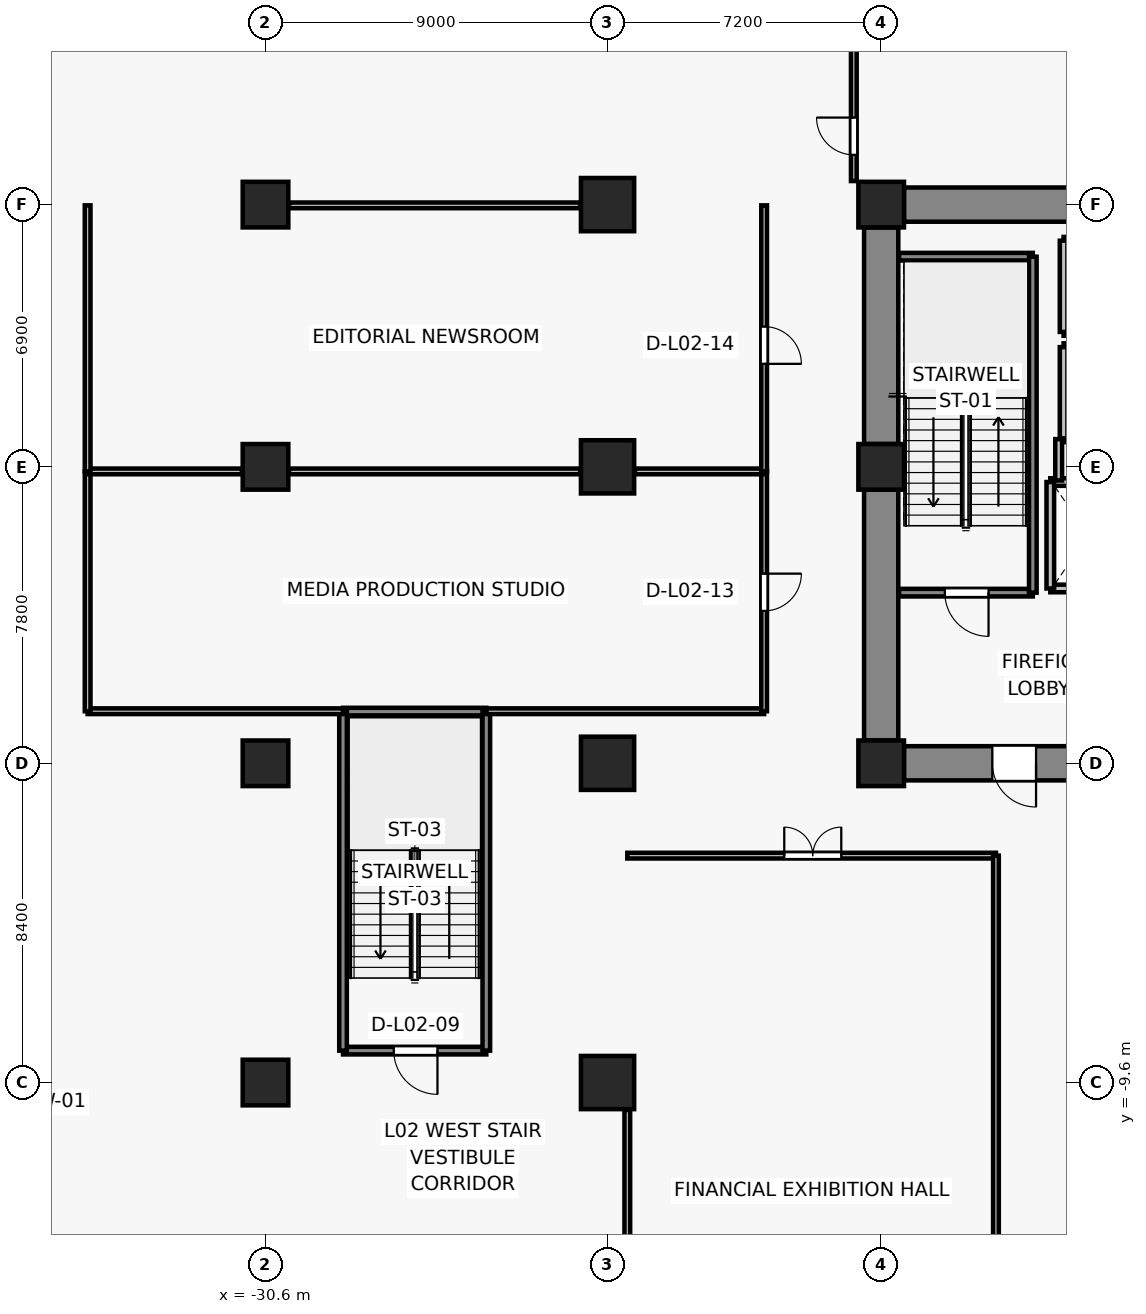
"""IFC4 building model, lengths in metres.
Left out: names, types, materials, properties, quantities, classifications, styles, units other than length and angle.
Written with IfcOpenShell. Run it as: python <this file> out.ifc"""

import sys

from ifc_helpers import new_model, si_unit, direction, frame, frame_2d, origin, origin_2d, place, context, subcontext, project, spatial, rectangle, extrude, source, transform, mapped, element, fill, save


model = new_model("IFC4")
c1 = context("Model", 3, precision=1e-05, world=origin(), true_north=direction((0.0, 1.0)))
c2 = subcontext(c1, "Body", "Model", "MODEL_VIEW")
j1 = project(units=[si_unit("LENGTHUNIT", "METRE"), si_unit("PLANEANGLEUNIT", "RADIAN")], contexts=[c1])
p1 = place(None, origin())
s1 = spatial("IfcSite", under=j1, at=p1, CompositionType="ELEMENT")
p2 = place(p1, origin())
s2 = spatial("IfcBuilding", under=s1, at=p2, CompositionType="ELEMENT")
p3 = place(p2, frame((0.0, 0.0, 9.4)))
s3 = spatial("IfcBuildingStorey", under=s2, at=p3, CompositionType="ELEMENT", Elevation=9.4)
for number, where, z_axis, x_axis in (
    (1, (-14.4, -1.2, 0.0), (0.0, 0.0, 1.0), (1.0, 0.0, 0.0)),
    (2, (-14.4, 6.6, 0.0), (0.0, 0.0, 1.0), (1.0, 0.0, 0.0)),
    (3, (-14.4, 13.5, 0.0), (0.0, 0.0, 1.0), (1.0, 0.0, 0.0)),
):
    element("IfcColumn", number, at=place(p3, frame(where, z_axis=z_axis, x_axis=x_axis)), inside=s3, PredefinedType="COLUMN", context=c2, shape_type="SweptSolid", body=[
        extrude(rectangle(XDim=1.2, YDim=1.2, at=origin_2d()), origin(), (0.0, 0.0, 1.0), 4.4),
    ])
for number, where, z_axis, x_axis in (
    (4, (-21.6, -9.6, 0.0), (0.0, 0.0, 1.0), (1.0, 0.0, 0.0)),
    (5, (-21.6, -1.2, 0.0), (0.0, 0.0, 1.0), (1.0, 0.0, 0.0)),
    (6, (-21.6, 6.6, 0.0), (0.0, 0.0, 1.0), (1.0, 0.0, 0.0)),
    (7, (-21.6, 13.5, 0.0), (0.0, 0.0, 1.0), (1.0, 0.0, 0.0)),
):
    element("IfcColumn", number, at=place(p3, frame(where, z_axis=z_axis, x_axis=x_axis)), inside=s3, PredefinedType="COLUMN", context=c2, shape_type="SweptSolid", body=[
        extrude(rectangle(XDim=1.4, YDim=1.4, at=origin_2d()), origin(), (0.0, 0.0, 1.0), 4.4),
    ])
for number, where, z_axis, x_axis in (
    (8, (-30.6, -9.6, 0.0), (0.0, 0.0, 1.0), (1.0, 0.0, 0.0)),
    (9, (-30.6, -1.2, 0.0), (0.0, 0.0, 1.0), (1.0, 0.0, 0.0)),
    (10, (-30.6, 6.6, 0.0), (0.0, 0.0, 1.0), (1.0, 0.0, 0.0)),
    (11, (-30.6, 13.5, 0.0), (0.0, 0.0, 1.0), (1.0, 0.0, 0.0)),
):
    element("IfcColumn", number, at=place(p3, frame(where, z_axis=z_axis, x_axis=x_axis)), inside=s3, PredefinedType="COLUMN", context=c2, shape_type="SweptSolid", body=[
        extrude(rectangle(XDim=1.2, YDim=1.2, at=origin_2d()), origin(), (0.0, 0.0, 1.0), 4.4),
    ])
p4 = place(p3, frame((-13.8, 13.5, 0.0), z_axis=(0.0, 0.0, 1.0), x_axis=(1.0, 0.0, 0.0)))
e12 = element("IfcWall", 12, at=p4, inside=s3, PredefinedType="SHEAR", context=c2, shape_type="SweptSolid", body=[
    extrude(rectangle(XDim=6.0, YDim=0.9, at=frame_2d((3.0, 0.0))), origin(), (0.0, 0.0, 1.0), 4.1),
])
p5 = place(p3, frame((-14.4, -0.6, 0.0), z_axis=(0.0, 0.0, 1.0), x_axis=(0.0, 1.0, 0.0)))
e13 = element("IfcWall", 13, at=p5, inside=s3, PredefinedType="SHEAR", context=c2, shape_type="SweptSolid", body=[
    extrude(rectangle(XDim=6.6, YDim=0.9, at=frame_2d((3.3, 0.0))), origin(), (0.0, 0.0, 1.0), 4.1),
])
p6 = place(p3, frame((-14.4, 7.2, 0.0), z_axis=(0.0, 0.0, 1.0), x_axis=(0.0, 1.0, 0.0)))
e14 = element("IfcWall", 14, at=p6, inside=s3, PredefinedType="SHEAR", context=c2, shape_type="SweptSolid", body=[
    extrude(rectangle(XDim=5.7, YDim=0.9, at=frame_2d((2.85, 0.0))), origin(), (0.0, 0.0, 1.0), 4.1),
])
p7 = place(p3, frame((-7.8, -1.2, 0.0), z_axis=(0.0, 0.0, 1.0), x_axis=(-1.0, 0.0, 0.0)))
e15 = element("IfcWall", 15, at=p7, inside=s3, PredefinedType="SHEAR", context=c2, shape_type="SweptSolid", body=[
    extrude(rectangle(XDim=6.0, YDim=0.9, at=frame_2d((3.0, 0.0))), origin(), (0.0, 0.0, 1.0), 4.1),
])
p8 = place(p7, frame((2.525, 0.0, 0.0)))
e16 = element("IfcOpeningElement", 16, at=p8, cuts=e15, PredefinedType="OPENING", context=c2, shape_type="SweptSolid", body=[
    extrude(rectangle(XDim=1.15, YDim=2.15, at=frame_2d((0.575, 1.075))), frame((0.0, 0.46, 0.0), z_axis=(0.0, -1.0, 0.0), x_axis=(1.0, 0.0, 0.0)), (0.0, 0.0, 1.0), 0.92),
])
p9 = place(p3, frame((-7.95, 3.4, 0.0), z_axis=(0.0, 0.0, 1.0), x_axis=(-1.0, 0.0, 0.0)))
e17 = element("IfcWall", 17, at=p9, inside=s3, PredefinedType="SOLIDWALL", context=c2, shape_type="SweptSolid", body=[
    extrude(rectangle(XDim=2.0, YDim=0.2, at=frame_2d((1.0, 0.0))), origin(), (0.0, 0.0, 1.0), 4.1),
])
p10 = place(p9, frame((0.45, 0.0, 0.0)))
e18 = element("IfcOpeningElement", 18, at=p10, cuts=e17, PredefinedType="OPENING", context=c2, shape_type="SweptSolid", body=[
    extrude(rectangle(XDim=1.1, YDim=2.2, at=frame_2d((0.55, 1.1))), frame((0.0, 0.11, 0.0), z_axis=(0.0, -1.0, 0.0), x_axis=(1.0, 0.0, 0.0)), (0.0, 0.0, 1.0), 0.22),
])
p11 = place(p3, frame((-9.95, 6.2, 0.0), z_axis=(0.0, 0.0, 1.0), x_axis=(1.0, 0.0, 0.0)))
e19 = element("IfcWall", 19, at=p11, inside=s3, PredefinedType="SOLIDWALL", context=c2, shape_type="SweptSolid", body=[
    extrude(rectangle(XDim=2.0, YDim=0.2, at=frame_2d((1.0, 0.0))), origin(), (0.0, 0.0, 1.0), 4.1),
])
p12 = place(p3, frame((-9.95, 3.4, 0.0), z_axis=(0.0, 0.0, 1.0), x_axis=(0.0, 1.0, 0.0)))
e20 = element("IfcWall", 20, at=p12, inside=s3, PredefinedType="SOLIDWALL", context=c2, shape_type="SweptSolid", body=[
    extrude(rectangle(XDim=2.8, YDim=0.2, at=frame_2d((1.4, 0.0))), origin(), (0.0, 0.0, 1.0), 4.1),
])
for number, where, z_axis, x_axis in (
    (21, (-7.4, 7.35, 0.0), (0.0, 0.0, 1.0), (-1.0, 0.0, 0.0)),
    (22, (-9.6, 9.75, 0.0), (0.0, 0.0, 1.0), (1.0, 0.0, 0.0)),
):
    element("IfcWall", number, at=place(p3, frame(where, z_axis=z_axis, x_axis=x_axis)), inside=s3, PredefinedType="SOLIDWALL", context=c2, shape_type="SweptSolid", body=[
        extrude(rectangle(XDim=2.2, YDim=0.2, at=frame_2d((1.1, 0.0))), origin(), (0.0, 0.0, 1.0), 3.19),
    ])
p13 = place(p3, frame((-9.6, 7.35, 0.0), z_axis=(0.0, 0.0, 1.0), x_axis=(0.0, 1.0, 0.0)))
e23 = element("IfcWall", 23, at=p13, inside=s3, PredefinedType="SOLIDWALL", context=c2, shape_type="SweptSolid", body=[
    extrude(rectangle(XDim=2.4, YDim=0.2, at=frame_2d((1.2, 0.0))), origin(), (0.0, 0.0, 1.0), 4.1),
])
for number, where, z_axis, x_axis in (
    (24, (-7.4, 10.15, 0.0), (0.0, 0.0, 1.0), (-1.0, 0.0, 0.0)),
    (25, (-9.6, 12.55, 0.0), (0.0, 0.0, 1.0), (1.0, 0.0, 0.0)),
):
    element("IfcWall", number, at=place(p3, frame(where, z_axis=z_axis, x_axis=x_axis)), inside=s3, PredefinedType="SOLIDWALL", context=c2, shape_type="SweptSolid", body=[
        extrude(rectangle(XDim=2.2, YDim=0.2, at=frame_2d((1.1, 0.0))), origin(), (0.0, 0.0, 1.0), 3.19),
    ])
p14 = place(p3, frame((-9.6, 10.15, 0.0), z_axis=(0.0, 0.0, 1.0), x_axis=(0.0, 1.0, 0.0)))
e26 = element("IfcWall", 26, at=p14, inside=s3, PredefinedType="SOLIDWALL", context=c2, shape_type="SweptSolid", body=[
    extrude(rectangle(XDim=2.4, YDim=0.2, at=frame_2d((1.2, 0.0))), origin(), (0.0, 0.0, 1.0), 4.1),
])
p15 = place(p3, frame((-10.41, 3.29, 0.0), z_axis=(0.0, 0.0, 1.0), x_axis=(-1.0, 0.0, 0.0)))
e27 = element("IfcWall", 27, at=p15, inside=s3, PredefinedType="SOLIDWALL", context=c2, shape_type="SweptSolid", body=[
    extrude(rectangle(XDim=3.52, YDim=0.2, at=frame_2d((1.76, 0.0))), origin(), (0.0, 0.0, 1.0), 4.1),
])
p16 = place(p15, frame((1.165, 0.0, 0.0)))
e28 = element("IfcOpeningElement", 28, at=p16, cuts=e27, PredefinedType="OPENING", context=c2, shape_type="SweptSolid", body=[
    extrude(rectangle(XDim=1.15, YDim=2.15, at=frame_2d((0.575, 1.075))), frame((0.0, 0.11, 0.0), z_axis=(0.0, -1.0, 0.0), x_axis=(1.0, 0.0, 0.0)), (0.0, 0.0, 1.0), 0.22),
])
p17 = place(p3, frame((-13.93, 12.13, 0.0), z_axis=(0.0, 0.0, 1.0), x_axis=(1.0, 0.0, 0.0)))
e29 = element("IfcWall", 29, at=p17, inside=s3, PredefinedType="SOLIDWALL", context=c2, shape_type="SweptSolid", body=[
    extrude(rectangle(XDim=3.52, YDim=0.2, at=frame_2d((1.76, 0.0))), origin(), (0.0, 0.0, 1.0), 4.1),
])
p18 = place(p3, frame((-10.41, 12.13, 0.0), z_axis=(0.0, 0.0, 1.0), x_axis=(0.0, -1.0, 0.0)))
e30 = element("IfcWall", 30, at=p18, inside=s3, PredefinedType="SOLIDWALL", context=c2, shape_type="SweptSolid", body=[
    extrude(rectangle(XDim=8.84, YDim=0.2, at=frame_2d((4.42, 0.0))), origin(), (0.0, 0.0, 1.0), 4.1),
])
p19 = place(p3, frame((-9.73, 6.24, 0.0), z_axis=(0.0, 0.0, 1.0), x_axis=(0.0, 1.0, 0.0)))
e31 = element("IfcWall", 31, at=p19, inside=s3, PredefinedType="PARTITIONING", context=c2, shape_type="SweptSolid", body=[
    extrude(rectangle(XDim=1.09, YDim=0.18, at=frame_2d((0.545, 0.0))), origin(), (0.0, 0.0, 1.0), 4.1),
])
p20 = place(p3, frame((-24.79, -8.76, 0.0), z_axis=(0.0, 0.0, 1.0), x_axis=(-1.0, 0.0, 0.0)))
e32 = element("IfcWall", 32, at=p20, inside=s3, PredefinedType="SOLIDWALL", context=c2, shape_type="SweptSolid", body=[
    extrude(rectangle(XDim=3.77, YDim=0.2, at=frame_2d((1.885, 0.0))), origin(), (0.0, 0.0, 1.0), 4.1),
])
p21 = place(p20, frame((1.285, 0.0, 0.0)))
e33 = element("IfcOpeningElement", 33, at=p21, cuts=e32, PredefinedType="OPENING", context=c2, shape_type="SweptSolid", body=[
    extrude(rectangle(XDim=1.15, YDim=2.15, at=frame_2d((0.575, 1.075))), frame((0.0, 0.11, 0.0), z_axis=(0.0, -1.0, 0.0), x_axis=(1.0, 0.0, 0.0)), (0.0, 0.0, 1.0), 0.22),
])
p22 = place(p3, frame((-28.56, 0.16, 0.0), z_axis=(0.0, 0.0, 1.0), x_axis=(1.0, 0.0, 0.0)))
e34 = element("IfcWall", 34, at=p22, inside=s3, PredefinedType="SOLIDWALL", context=c2, shape_type="SweptSolid", body=[
    extrude(rectangle(XDim=3.77, YDim=0.2, at=frame_2d((1.885, 0.0))), origin(), (0.0, 0.0, 1.0), 4.1),
])
for number, where, z_axis, x_axis in (
    (35, (-28.56, -8.76, 0.0), (0.0, 0.0, 1.0), (0.0, 1.0, 0.0)),
    (36, (-24.79, 0.16, 0.0), (0.0, 0.0, 1.0), (0.0, -1.0, 0.0)),
):
    element("IfcWall", number, at=place(p3, frame(where, z_axis=z_axis, x_axis=x_axis)), inside=s3, PredefinedType="SOLIDWALL", context=c2, shape_type="SweptSolid", body=[
        extrude(rectangle(XDim=8.92, YDim=0.2, at=frame_2d((4.46, 0.0))), origin(), (0.0, 0.0, 1.0), 4.1),
    ])
p23 = place(p3, frame((-21.08, -3.63, 0.0), z_axis=(0.0, 0.0, 1.0), x_axis=(1.0, 0.0, 0.0)))
e37 = element("IfcWall", 37, at=p23, inside=s3, PredefinedType="PARTITIONING", context=c2, shape_type="SweptSolid", body=[
    extrude(rectangle(XDim=9.7, YDim=0.15, at=frame_2d((4.85, 0.0))), origin(), (0.0, 0.0, 1.0), 3.239),
])
p24 = place(p23, frame((4.13, 0.0, 0.0)))
e38 = element("IfcOpeningElement", 38, at=p24, cuts=e37, PredefinedType="OPENING", context=c2, shape_type="SweptSolid", body=[
    extrude(rectangle(XDim=1.5, YDim=2.2, at=frame_2d((0.75, 1.1))), frame((0.0, 0.085, 0.0), z_axis=(0.0, -1.0, 0.0), x_axis=(1.0, 0.0, 0.0)), (0.0, 0.0, 1.0), 0.17),
])
p25 = place(p3, frame((-21.08, -17.48, 0.0), z_axis=(0.0, 0.0, 1.0), x_axis=(0.0, 1.0, 0.0)))
e39 = element("IfcWall", 39, at=p25, inside=s3, PredefinedType="PARTITIONING", context=c2, shape_type="SweptSolid", body=[
    extrude(rectangle(XDim=7.16, YDim=0.15, at=frame_2d((3.58, 0.0))), origin(), (0.0, 0.0, 1.0), 3.29),
])
p26 = place(p3, frame((-11.38, -3.63, 0.0), z_axis=(0.0, 0.0, 1.0), x_axis=(0.0, -1.0, 0.0)))
e40 = element("IfcWall", 40, at=p26, inside=s3, PredefinedType="PARTITIONING", context=c2, shape_type="SweptSolid", body=[
    extrude(rectangle(XDim=17.65, YDim=0.15, at=frame_2d((8.825, 0.0))), origin(), (0.0, 0.0, 1.0), 3.19),
])
p27 = place(p3, frame((-28.56, 0.17, 0.0), z_axis=(0.0, 0.0, 1.0), x_axis=(-1.0, 0.0, 0.0)))
e41 = element("IfcWall", 41, at=p27, inside=s3, PredefinedType="PARTITIONING", context=c2, shape_type="SweptSolid", body=[
    extrude(rectangle(XDim=6.72, YDim=0.15, at=frame_2d((3.36, 0.0))), origin(), (0.0, 0.0, 1.0), 3.19),
])
p28 = place(p3, frame((-17.48, 0.17, 0.0), z_axis=(0.0, 0.0, 1.0), x_axis=(-1.0, 0.0, 0.0)))
e42 = element("IfcWall", 42, at=p28, inside=s3, PredefinedType="PARTITIONING", context=c2, shape_type="SweptSolid", body=[
    extrude(rectangle(XDim=7.31, YDim=0.15, at=frame_2d((3.655, 0.0))), origin(), (0.0, 0.0, 1.0), 3.19),
])
p29 = place(p3, frame((-29.98, 6.48, 0.0), z_axis=(0.0, 0.0, 1.0), x_axis=(1.0, 0.0, 0.0)))
e43 = element("IfcWall", 43, at=p29, inside=s3, PredefinedType="PARTITIONING", context=c2, shape_type="SweptSolid", body=[
    extrude(rectangle(XDim=7.66, YDim=0.15, at=frame_2d((3.83, 0.0))), origin(), (0.0, 0.0, 1.0), 3.19),
])
p30 = place(p3, frame((-35.28, 0.17, 0.0), z_axis=(0.0, 0.0, 1.0), x_axis=(0.0, 1.0, 0.0)))
e44 = element("IfcWall", 44, at=p30, inside=s3, PredefinedType="PARTITIONING", context=c2, shape_type="SweptSolid", body=[
    extrude(rectangle(XDim=6.31, YDim=0.15, at=frame_2d((3.155, 0.0))), origin(), (0.0, 0.0, 1.0), 4.1),
])
p31 = place(p3, frame((-17.48, 6.48, 0.0), z_axis=(0.0, 0.0, 1.0), x_axis=(0.0, -1.0, 0.0)))
e45 = element("IfcWall", 45, at=p31, inside=s3, PredefinedType="PARTITIONING", context=c2, shape_type="SweptSolid", body=[
    extrude(rectangle(XDim=6.31, YDim=0.15, at=frame_2d((3.155, 0.0))), origin(), (0.0, 0.0, 1.0), 3.19),
])
p32 = place(p31, frame((2.69, 0.0, 0.0)))
e46 = element("IfcOpeningElement", 46, at=p32, cuts=e45, PredefinedType="OPENING", context=c2, shape_type="SweptSolid", body=[
    extrude(rectangle(XDim=0.98, YDim=2.15, at=frame_2d((0.49, 1.075))), frame((0.0, 0.085, 0.0), z_axis=(0.0, -1.0, 0.0), x_axis=(1.0, 0.0, 0.0)), (0.0, 0.0, 1.0), 0.17),
])
p33 = place(p3, frame((-31.22, 6.48, 0.0), z_axis=(0.0, 0.0, 1.0), x_axis=(-1.0, 0.0, 0.0)))
e47 = element("IfcWall", 47, at=p33, inside=s3, PredefinedType="PARTITIONING", context=c2, shape_type="SweptSolid", body=[
    extrude(rectangle(XDim=4.06, YDim=0.15, at=frame_2d((2.03, 0.0))), origin(), (0.0, 0.0, 1.0), 4.1),
])
p34 = place(p3, frame((-17.48, 6.48, 0.0), z_axis=(0.0, 0.0, 1.0), x_axis=(-1.0, 0.0, 0.0)))
e48 = element("IfcWall", 48, at=p34, inside=s3, PredefinedType="PARTITIONING", context=c2, shape_type="SweptSolid", body=[
    extrude(rectangle(XDim=3.4, YDim=0.15, at=frame_2d((1.7, 0.0))), origin(), (0.0, 0.0, 1.0), 3.19),
])
p35 = place(p3, frame((-29.98, 13.48, 0.0), z_axis=(0.0, 0.0, 1.0), x_axis=(1.0, 0.0, 0.0)))
e49 = element("IfcWall", 49, at=p35, inside=s3, PredefinedType="PARTITIONING", context=c2, shape_type="SweptSolid", body=[
    extrude(rectangle(XDim=7.66, YDim=0.15, at=frame_2d((3.83, 0.0))), origin(), (0.0, 0.0, 1.0), 3.19),
])
p36 = place(p3, frame((-35.28, 6.48, 0.0), z_axis=(0.0, 0.0, 1.0), x_axis=(0.0, 1.0, 0.0)))
e50 = element("IfcWall", 50, at=p36, inside=s3, PredefinedType="PARTITIONING", context=c2, shape_type="SweptSolid", body=[
    extrude(rectangle(XDim=7.0, YDim=0.15, at=frame_2d((3.5, 0.0))), origin(), (0.0, 0.0, 1.0), 4.1),
])
p37 = place(p3, frame((-17.48, 13.48, 0.0), z_axis=(0.0, 0.0, 1.0), x_axis=(0.0, -1.0, 0.0)))
e51 = element("IfcWall", 51, at=p37, inside=s3, PredefinedType="PARTITIONING", context=c2, shape_type="SweptSolid", body=[
    extrude(rectangle(XDim=7.0, YDim=0.15, at=frame_2d((3.5, 0.0))), origin(), (0.0, 0.0, 1.0), 3.19),
])
p38 = place(p37, frame((3.19, 0.0, 0.0)))
e52 = element("IfcOpeningElement", 52, at=p38, cuts=e51, PredefinedType="OPENING", context=c2, shape_type="SweptSolid", body=[
    extrude(rectangle(XDim=0.98, YDim=2.15, at=frame_2d((0.49, 1.075))), frame((0.0, 0.085, 0.0), z_axis=(0.0, -1.0, 0.0), x_axis=(1.0, 0.0, 0.0)), (0.0, 0.0, 1.0), 0.17),
])
p39 = place(p3, frame((-15.12, 14.12, 0.0), z_axis=(0.0, 0.0, 1.0), x_axis=(0.0, 1.0, 0.0)))
e53 = element("IfcWall", 53, at=p39, inside=s3, PredefinedType="PARTITIONING", context=c2, shape_type="SweptSolid", body=[
    extrude(rectangle(XDim=7.76, YDim=0.15, at=frame_2d((3.88, 0.0))), origin(), (0.0, 0.0, 1.0), 3.19),
])
p40 = place(p39, frame((0.69, 0.0, 0.0)))
e54 = element("IfcOpeningElement", 54, at=p40, cuts=e53, PredefinedType="OPENING", context=c2, shape_type="SweptSolid", body=[
    extrude(rectangle(XDim=0.98, YDim=2.15, at=frame_2d((0.49, 1.075))), frame((0.0, 0.085, 0.0), z_axis=(0.0, -1.0, 0.0), x_axis=(1.0, 0.0, 0.0)), (0.0, 0.0, 1.0), 0.17),
])
m1 = source(origin(), c2, "Body", "SweptSolid", [
    extrude(rectangle(XDim=1.15, YDim=2.15, at=frame_2d((0.575, 1.075))), frame((0.0, 0.025, 0.0), z_axis=(0.0, -1.0, 0.0), x_axis=(1.0, 0.0, 0.0)), (0.0, 0.0, 1.0), 0.05),
])
p41 = place(p16, origin())
e55 = element("IfcDoor", 55, at=p41, inside=s3, OperationType="SINGLE_SWING_LEFT", PredefinedType="DOOR", context=c2, shape_type="MappedRepresentation", body=[
    mapped(m1, transform((0.0, 0.0, 0.0), x_axis=(1.0, 0.0, 0.0), y_axis=(0.0, 1.0, 0.0), z_axis=(0.0, 0.0, 1.0), scale=1.0)),
])
fill(e28, e55)
p42 = place(p8, origin())
e56 = element("IfcDoor", 56, at=p42, inside=s3, OperationType="SINGLE_SWING_LEFT", PredefinedType="DOOR", context=c2, shape_type="MappedRepresentation", body=[
    mapped(m1, transform((0.0, 0.0, 0.0), x_axis=(1.0, 0.0, 0.0), y_axis=(0.0, 1.0, 0.0), z_axis=(0.0, 0.0, 1.0), scale=1.0)),
])
fill(e16, e56)
p43 = place(p21, origin())
e57 = element("IfcDoor", 57, at=p43, inside=s3, OperationType="SINGLE_SWING_LEFT", PredefinedType="DOOR", context=c2, shape_type="MappedRepresentation", body=[
    mapped(m1, transform((0.0, 0.0, 0.0), x_axis=(1.0, 0.0, 0.0), y_axis=(0.0, 1.0, 0.0), z_axis=(0.0, 0.0, 1.0), scale=1.0)),
])
fill(e33, e57)
m2 = source(origin(), c2, "Body", "SweptSolid", [
    extrude(rectangle(XDim=1.5, YDim=2.2, at=frame_2d((0.75, 1.1))), frame((0.0, 0.025, 0.0), z_axis=(0.0, -1.0, 0.0), x_axis=(1.0, 0.0, 0.0)), (0.0, 0.0, 1.0), 0.05),
])
p44 = place(p24, origin())
e58 = element("IfcDoor", 58, at=p44, inside=s3, OperationType="DOUBLE_DOOR_SINGLE_SWING", PredefinedType="DOOR", context=c2, shape_type="MappedRepresentation", body=[
    mapped(m2, transform((0.0, 0.0, 0.0), x_axis=(1.0, 0.0, 0.0), y_axis=(0.0, 1.0, 0.0), z_axis=(0.0, 0.0, 1.0), scale=1.0)),
])
fill(e38, e58)
m3 = source(origin(), c2, "Body", "SweptSolid", [
    extrude(rectangle(XDim=0.98, YDim=2.15, at=frame_2d((0.49, 1.075))), frame((0.0, 0.025, 0.0), z_axis=(0.0, -1.0, 0.0), x_axis=(1.0, 0.0, 0.0)), (0.0, 0.0, 1.0), 0.05),
])
p45 = place(p32, origin())
e59 = element("IfcDoor", 59, at=p45, inside=s3, OperationType="SINGLE_SWING_LEFT", PredefinedType="DOOR", context=c2, shape_type="MappedRepresentation", body=[
    mapped(m3, transform((0.0, 0.0, 0.0), x_axis=(1.0, 0.0, 0.0), y_axis=(0.0, 1.0, 0.0), z_axis=(0.0, 0.0, 1.0), scale=1.0)),
])
fill(e46, e59)
p46 = place(p38, origin())
e60 = element("IfcDoor", 60, at=p46, inside=s3, OperationType="SINGLE_SWING_RIGHT", PredefinedType="DOOR", context=c2, shape_type="MappedRepresentation", body=[
    mapped(m3, transform((0.0, 0.0, 0.0), x_axis=(1.0, 0.0, 0.0), y_axis=(0.0, 1.0, 0.0), z_axis=(0.0, 0.0, 1.0), scale=1.0)),
])
fill(e52, e60)
p47 = place(p40, origin())
e61 = element("IfcDoor", 61, at=p47, inside=s3, OperationType="SINGLE_SWING_RIGHT", PredefinedType="DOOR", context=c2, shape_type="MappedRepresentation", body=[
    mapped(m3, transform((0.0, 0.0, 0.0), x_axis=(1.0, 0.0, 0.0), y_axis=(0.0, 1.0, 0.0), z_axis=(0.0, 0.0, 1.0), scale=1.0)),
])
fill(e54, e61)
save(model, sys.argv[1])
